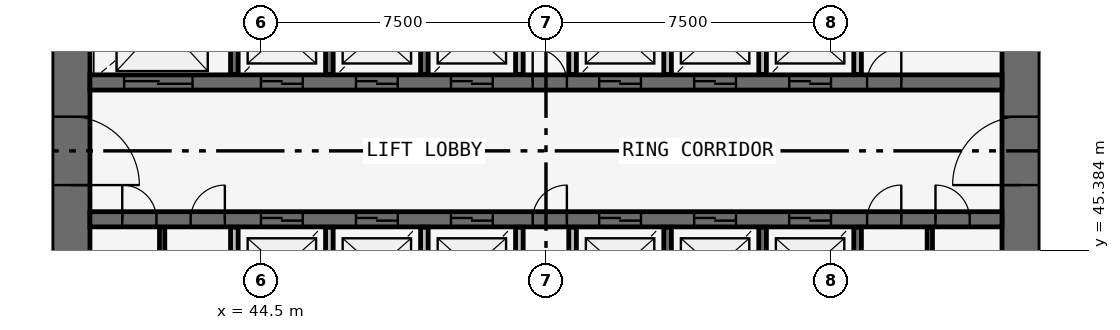
"""IFC4 building model, lengths in metres.
Left out: names, types, materials, properties, quantities, classifications, styles, units other than length and angle.
Written with IfcOpenShell. Run it as: python <this file> out.ifc"""

import sys

from ifc_helpers import new_model, si_unit, direction, frame, frame_2d, origin, place, context, subcontext, project, spatial, rectangle, extrude, source, transform, mapped, element, fill, save


model = new_model("IFC4")
c1 = context("Model", 3, precision=1e-05, world=origin(), true_north=direction((0.0, 1.0)))
c2 = subcontext(c1, "Body", "Model", "MODEL_VIEW")
j1 = project(units=[si_unit("LENGTHUNIT", "METRE"), si_unit("PLANEANGLEUNIT", "RADIAN")], contexts=[c1])
p1 = place(None, origin())
s1 = spatial("IfcSite", under=j1, at=p1, CompositionType="ELEMENT")
p2 = place(p1, origin())
s2 = spatial("IfcBuilding", under=s1, at=p2, CompositionType="ELEMENT")
p3 = place(p2, origin())
s3 = spatial("IfcBuildingStorey", under=s2, at=p3, CompositionType="ELEMENT", Elevation=0.0)
p4 = place(p3, frame((64.5, 38.0, -0.35), z_axis=(0.0, 0.0, 1.0), x_axis=(0.0, 1.0, 0.0)))
e1 = element("IfcWall", 1, at=p4, inside=s3, PredefinedType="SHEAR", context=c2, shape_type="SweptSolid", body=[
    extrude(rectangle(XDim=20.0, YDim=1.0, at=frame_2d((10.0, 0.0))), origin(), (0.0, 0.0, 1.0), 5.35),
])
p5 = place(p4, frame((9.1, 0.0, 0.35)))
e2 = element("IfcOpeningElement", 2, at=p5, cuts=e1, PredefinedType="OPENING", context=c2, shape_type="SweptSolid", body=[
    extrude(rectangle(XDim=1.8, YDim=2.1, at=frame_2d((0.9, 1.05))), frame((0.0, 0.51, 0.0), z_axis=(0.0, -1.0, 0.0), x_axis=(1.0, 0.0, 0.0)), (0.0, 0.0, 1.0), 1.02),
])
p6 = place(p3, frame((39.5, 58.0, -0.35), z_axis=(0.0, 0.0, 1.0), x_axis=(0.0, -1.0, 0.0)))
e3 = element("IfcWall", 3, at=p6, inside=s3, PredefinedType="SHEAR", context=c2, shape_type="SweptSolid", body=[
    extrude(rectangle(XDim=20.0, YDim=1.0, at=frame_2d((10.0, 0.0))), origin(), (0.0, 0.0, 1.0), 5.35),
])
p7 = place(p6, frame((9.1, 0.0, 0.35)))
e4 = element("IfcOpeningElement", 4, at=p7, cuts=e3, PredefinedType="OPENING", context=c2, shape_type="SweptSolid", body=[
    extrude(rectangle(XDim=1.8, YDim=2.1, at=frame_2d((0.9, 1.05))), frame((0.0, 0.51, 0.0), z_axis=(0.0, -1.0, 0.0), x_axis=(1.0, 0.0, 0.0)), (0.0, 0.0, 1.0), 1.02),
])
p8 = place(p3, frame((40.0, 49.8, -0.35), z_axis=(0.0, 0.0, 1.0), x_axis=(1.0, 0.0, 0.0)))
e5 = element("IfcWall", 5, at=p8, inside=s3, PredefinedType="SHEAR", context=c2, shape_type="SweptSolid", body=[
    extrude(rectangle(XDim=24.0, YDim=0.4, at=frame_2d((12.0, 0.0))), origin(), (0.0, 0.0, 1.0), 5.35),
])
p9 = place(p8, frame((13.4, 0.0, 0.35)))
e6 = element("IfcOpeningElement", 6, at=p9, cuts=e5, PredefinedType="OPENING", context=c2, shape_type="SweptSolid", body=[
    extrude(rectangle(XDim=1.1, YDim=2.1, at=frame_2d((0.55, 1.05))), frame((0.0, 0.21, 0.0), z_axis=(0.0, -1.0, 0.0), x_axis=(1.0, 0.0, 0.0)), (0.0, 0.0, 1.0), 0.42),
])
p10 = place(p8, frame((15.9, 0.0, 0.35)))
e7 = element("IfcOpeningElement", 7, at=p10, cuts=e5, PredefinedType="OPENING", context=c2, shape_type="SweptSolid", body=[
    extrude(rectangle(XDim=1.1, YDim=2.1, at=frame_2d((0.55, 1.05))), frame((0.0, 0.21, 0.0), z_axis=(0.0, -1.0, 0.0), x_axis=(1.0, 0.0, 0.0)), (0.0, 0.0, 1.0), 0.42),
])
p11 = place(p8, frame((18.4, 0.0, 0.35)))
e8 = element("IfcOpeningElement", 8, at=p11, cuts=e5, PredefinedType="OPENING", context=c2, shape_type="SweptSolid", body=[
    extrude(rectangle(XDim=1.1, YDim=2.1, at=frame_2d((0.55, 1.05))), frame((0.0, 0.21, 0.0), z_axis=(0.0, -1.0, 0.0), x_axis=(1.0, 0.0, 0.0)), (0.0, 0.0, 1.0), 0.42),
])
p12 = place(p8, frame((4.5, 0.0, 0.35)))
e9 = element("IfcOpeningElement", 9, at=p12, cuts=e5, PredefinedType="OPENING", context=c2, shape_type="SweptSolid", body=[
    extrude(rectangle(XDim=1.1, YDim=2.1, at=frame_2d((0.55, 1.05))), frame((0.0, 0.21, 0.0), z_axis=(0.0, -1.0, 0.0), x_axis=(1.0, 0.0, 0.0)), (0.0, 0.0, 1.0), 0.42),
])
p13 = place(p8, frame((7.0, 0.0, 0.35)))
e10 = element("IfcOpeningElement", 10, at=p13, cuts=e5, PredefinedType="OPENING", context=c2, shape_type="SweptSolid", body=[
    extrude(rectangle(XDim=1.1, YDim=2.1, at=frame_2d((0.55, 1.05))), frame((0.0, 0.21, 0.0), z_axis=(0.0, -1.0, 0.0), x_axis=(1.0, 0.0, 0.0)), (0.0, 0.0, 1.0), 0.42),
])
p14 = place(p8, frame((9.5, 0.0, 0.35)))
e11 = element("IfcOpeningElement", 11, at=p14, cuts=e5, PredefinedType="OPENING", context=c2, shape_type="SweptSolid", body=[
    extrude(rectangle(XDim=1.1, YDim=2.1, at=frame_2d((0.55, 1.05))), frame((0.0, 0.21, 0.0), z_axis=(0.0, -1.0, 0.0), x_axis=(1.0, 0.0, 0.0)), (0.0, 0.0, 1.0), 0.42),
])
p15 = place(p8, frame((0.9, 0.0, 0.35)))
e12 = element("IfcOpeningElement", 12, at=p15, cuts=e5, PredefinedType="OPENING", context=c2, shape_type="SweptSolid", body=[
    extrude(rectangle(XDim=1.8, YDim=2.4, at=frame_2d((0.9, 1.2))), frame((0.0, 0.21, 0.0), z_axis=(0.0, -1.0, 0.0), x_axis=(1.0, 0.0, 0.0)), (0.0, 0.0, 1.0), 0.42),
])
p16 = place(p8, frame((20.45, 0.0, 0.35)))
e13 = element("IfcOpeningElement", 13, at=p16, cuts=e5, PredefinedType="OPENING", context=c2, shape_type="SweptSolid", body=[
    extrude(rectangle(XDim=0.9, YDim=2.1, at=frame_2d((0.45, 1.05))), frame((0.0, 0.21, 0.0), z_axis=(0.0, -1.0, 0.0), x_axis=(1.0, 0.0, 0.0)), (0.0, 0.0, 1.0), 0.42),
])
p17 = place(p8, frame((11.65, 0.0, 0.35)))
e14 = element("IfcOpeningElement", 14, at=p17, cuts=e5, PredefinedType="OPENING", context=c2, shape_type="SweptSolid", body=[
    extrude(rectangle(XDim=0.9, YDim=2.1, at=frame_2d((0.45, 1.05))), frame((0.0, 0.21, 0.0), z_axis=(0.0, -1.0, 0.0), x_axis=(1.0, 0.0, 0.0)), (0.0, 0.0, 1.0), 0.42),
])
p18 = place(p3, frame((40.0, 46.2, -0.35), z_axis=(0.0, 0.0, 1.0), x_axis=(1.0, 0.0, 0.0)))
e15 = element("IfcWall", 15, at=p18, inside=s3, PredefinedType="SHEAR", context=c2, shape_type="SweptSolid", body=[
    extrude(rectangle(XDim=24.0, YDim=0.4, at=frame_2d((12.0, 0.0))), origin(), (0.0, 0.0, 1.0), 5.35),
])
p19 = place(p18, frame((13.4, 0.0, 0.35)))
e16 = element("IfcOpeningElement", 16, at=p19, cuts=e15, PredefinedType="OPENING", context=c2, shape_type="SweptSolid", body=[
    extrude(rectangle(XDim=1.1, YDim=2.1, at=frame_2d((0.55, 1.05))), frame((0.0, 0.21, 0.0), z_axis=(0.0, -1.0, 0.0), x_axis=(1.0, 0.0, 0.0)), (0.0, 0.0, 1.0), 0.42),
])
p20 = place(p18, frame((15.9, 0.0, 0.35)))
e17 = element("IfcOpeningElement", 17, at=p20, cuts=e15, PredefinedType="OPENING", context=c2, shape_type="SweptSolid", body=[
    extrude(rectangle(XDim=1.1, YDim=2.1, at=frame_2d((0.55, 1.05))), frame((0.0, 0.21, 0.0), z_axis=(0.0, -1.0, 0.0), x_axis=(1.0, 0.0, 0.0)), (0.0, 0.0, 1.0), 0.42),
])
p21 = place(p18, frame((18.4, 0.0, 0.35)))
e18 = element("IfcOpeningElement", 18, at=p21, cuts=e15, PredefinedType="OPENING", context=c2, shape_type="SweptSolid", body=[
    extrude(rectangle(XDim=1.1, YDim=2.1, at=frame_2d((0.55, 1.05))), frame((0.0, 0.21, 0.0), z_axis=(0.0, -1.0, 0.0), x_axis=(1.0, 0.0, 0.0)), (0.0, 0.0, 1.0), 0.42),
])
p22 = place(p18, frame((4.5, 0.0, 0.35)))
e19 = element("IfcOpeningElement", 19, at=p22, cuts=e15, PredefinedType="OPENING", context=c2, shape_type="SweptSolid", body=[
    extrude(rectangle(XDim=1.1, YDim=2.1, at=frame_2d((0.55, 1.05))), frame((0.0, 0.21, 0.0), z_axis=(0.0, -1.0, 0.0), x_axis=(1.0, 0.0, 0.0)), (0.0, 0.0, 1.0), 0.42),
])
p23 = place(p18, frame((7.0, 0.0, 0.35)))
e20 = element("IfcOpeningElement", 20, at=p23, cuts=e15, PredefinedType="OPENING", context=c2, shape_type="SweptSolid", body=[
    extrude(rectangle(XDim=1.1, YDim=2.1, at=frame_2d((0.55, 1.05))), frame((0.0, 0.21, 0.0), z_axis=(0.0, -1.0, 0.0), x_axis=(1.0, 0.0, 0.0)), (0.0, 0.0, 1.0), 0.42),
])
p24 = place(p18, frame((9.5, 0.0, 0.35)))
e21 = element("IfcOpeningElement", 21, at=p24, cuts=e15, PredefinedType="OPENING", context=c2, shape_type="SweptSolid", body=[
    extrude(rectangle(XDim=1.1, YDim=2.1, at=frame_2d((0.55, 1.05))), frame((0.0, 0.21, 0.0), z_axis=(0.0, -1.0, 0.0), x_axis=(1.0, 0.0, 0.0)), (0.0, 0.0, 1.0), 0.42),
])
p25 = place(p18, frame((20.45, 0.0, 0.35)))
e22 = element("IfcOpeningElement", 22, at=p25, cuts=e15, PredefinedType="OPENING", context=c2, shape_type="SweptSolid", body=[
    extrude(rectangle(XDim=0.9, YDim=2.1, at=frame_2d((0.45, 1.05))), frame((0.0, 0.21, 0.0), z_axis=(0.0, -1.0, 0.0), x_axis=(1.0, 0.0, 0.0)), (0.0, 0.0, 1.0), 0.42),
])
p26 = place(p18, frame((22.25, 0.0, 0.35)))
e23 = element("IfcOpeningElement", 23, at=p26, cuts=e15, PredefinedType="OPENING", context=c2, shape_type="SweptSolid", body=[
    extrude(rectangle(XDim=0.9, YDim=2.1, at=frame_2d((0.45, 1.05))), frame((0.0, 0.21, 0.0), z_axis=(0.0, -1.0, 0.0), x_axis=(1.0, 0.0, 0.0)), (0.0, 0.0, 1.0), 0.42),
])
p27 = place(p18, frame((0.85, 0.0, 0.35)))
e24 = element("IfcOpeningElement", 24, at=p27, cuts=e15, PredefinedType="OPENING", context=c2, shape_type="SweptSolid", body=[
    extrude(rectangle(XDim=0.9, YDim=2.1, at=frame_2d((0.45, 1.05))), frame((0.0, 0.21, 0.0), z_axis=(0.0, -1.0, 0.0), x_axis=(1.0, 0.0, 0.0)), (0.0, 0.0, 1.0), 0.42),
])
p28 = place(p18, frame((2.65, 0.0, 0.35)))
e25 = element("IfcOpeningElement", 25, at=p28, cuts=e15, PredefinedType="OPENING", context=c2, shape_type="SweptSolid", body=[
    extrude(rectangle(XDim=0.9, YDim=2.1, at=frame_2d((0.45, 1.05))), frame((0.0, 0.21, 0.0), z_axis=(0.0, -1.0, 0.0), x_axis=(1.0, 0.0, 0.0)), (0.0, 0.0, 1.0), 0.42),
])
p29 = place(p18, frame((11.65, 0.0, 0.35)))
e26 = element("IfcOpeningElement", 26, at=p29, cuts=e15, PredefinedType="OPENING", context=c2, shape_type="SweptSolid", body=[
    extrude(rectangle(XDim=0.9, YDim=2.1, at=frame_2d((0.45, 1.05))), frame((0.0, 0.21, 0.0), z_axis=(0.0, -1.0, 0.0), x_axis=(1.0, 0.0, 0.0)), (0.0, 0.0, 1.0), 0.42),
])
for number, where, z_axis, x_axis in (
    (27, (43.8, 45.99, 0.0), (0.0, 0.0, 1.0), (0.0, -1.0, 0.0)),
    (28, (43.8, 52.37, 0.0), (0.0, 0.0, 1.0), (0.0, -1.0, 0.0)),
):
    element("IfcWall", number, at=place(p3, frame(where, z_axis=z_axis, x_axis=x_axis)), inside=s3, PredefinedType="SOLIDWALL", context=c2, shape_type="SweptSolid", body=[
        extrude(rectangle(XDim=2.36, YDim=0.2, at=frame_2d((1.18, 0.0))), origin(), (0.0, 0.0, 1.0), 4.65),
    ])
p30 = place(p3, frame((46.3, 43.6, 0.0), z_axis=(0.0, 0.0, 1.0), x_axis=(0.0, 1.0, 0.0)))
e29 = element("IfcWall", 29, at=p30, inside=s3, PredefinedType="SOLIDWALL", context=c2, shape_type="SweptSolid", body=[
    extrude(rectangle(XDim=2.39, YDim=0.2, at=frame_2d((1.195, 0.0))), origin(), (0.0, 0.0, 1.0), 4.65),
])
for number, where, z_axis, x_axis in (
    (30, (46.3, 50.01, 0.0), (0.0, 0.0, 1.0), (0.0, 1.0, 0.0)),
    (31, (48.8, 43.63, 0.0), (0.0, 0.0, 1.0), (0.0, 1.0, 0.0)),
    (32, (48.8, 50.01, 0.0), (0.0, 0.0, 1.0), (0.0, 1.0, 0.0)),
    (33, (51.3, 43.63, 0.0), (0.0, 0.0, 1.0), (0.0, 1.0, 0.0)),
):
    element("IfcWall", number, at=place(p3, frame(where, z_axis=z_axis, x_axis=x_axis)), inside=s3, PredefinedType="SOLIDWALL", context=c2, shape_type="SweptSolid", body=[
        extrude(rectangle(XDim=2.36, YDim=0.2, at=frame_2d((1.18, 0.0))), origin(), (0.0, 0.0, 1.0), 4.65),
    ])
for number, where, z_axis, x_axis in (
    (34, (51.3, 50.01, 0.0), (0.0, 0.0, 1.0), (0.0, 1.0, 0.0)),
    (35, (52.7, 45.99, 0.0), (0.0, 0.0, 1.0), (0.0, -1.0, 0.0)),
):
    element("IfcWall", number, at=place(p3, frame(where, z_axis=z_axis, x_axis=x_axis)), inside=s3, PredefinedType="SOLIDWALL", context=c2, shape_type="SweptSolid", body=[
        extrude(rectangle(XDim=2.39, YDim=0.2, at=frame_2d((1.195, 0.0))), origin(), (0.0, 0.0, 1.0), 4.65),
    ])
for number, where, z_axis, x_axis in (
    (36, (52.7, 52.37, 0.0), (0.0, 0.0, 1.0), (0.0, -1.0, 0.0)),
    (37, (55.2, 43.63, 0.0), (0.0, 0.0, 1.0), (0.0, 1.0, 0.0)),
    (38, (55.2, 50.01, 0.0), (0.0, 0.0, 1.0), (0.0, 1.0, 0.0)),
    (39, (57.7, 43.63, 0.0), (0.0, 0.0, 1.0), (0.0, 1.0, 0.0)),
):
    element("IfcWall", number, at=place(p3, frame(where, z_axis=z_axis, x_axis=x_axis)), inside=s3, PredefinedType="SOLIDWALL", context=c2, shape_type="SweptSolid", body=[
        extrude(rectangle(XDim=2.36, YDim=0.2, at=frame_2d((1.18, 0.0))), origin(), (0.0, 0.0, 1.0), 4.65),
    ])
p31 = place(p3, frame((57.7, 50.01, 0.0), z_axis=(0.0, 0.0, 1.0), x_axis=(0.0, 1.0, 0.0)))
e40 = element("IfcWall", 40, at=p31, inside=s3, PredefinedType="SOLIDWALL", context=c2, shape_type="SweptSolid", body=[
    extrude(rectangle(XDim=2.39, YDim=0.2, at=frame_2d((1.195, 0.0))), origin(), (0.0, 0.0, 1.0), 4.65),
])
for number, where, z_axis, x_axis in (
    (41, (60.2, 43.63, 0.0), (0.0, 0.0, 1.0), (0.0, 1.0, 0.0)),
    (42, (60.2, 50.01, 0.0), (0.0, 0.0, 1.0), (0.0, 1.0, 0.0)),
):
    element("IfcWall", number, at=place(p3, frame(where, z_axis=z_axis, x_axis=x_axis)), inside=s3, PredefinedType="SOLIDWALL", context=c2, shape_type="SweptSolid", body=[
        extrude(rectangle(XDim=2.36, YDim=0.2, at=frame_2d((1.18, 0.0))), origin(), (0.0, 0.0, 1.0), 4.65),
    ])
for number, where, z_axis, x_axis in (
    (43, (41.9, 43.6, 0.0), (0.0, 0.0, 1.0), (0.0, 1.0, 0.0)),
    (44, (62.1, 43.6, 0.0), (0.0, 0.0, 1.0), (0.0, 1.0, 0.0)),
):
    element("IfcWall", number, at=place(p3, frame(where, z_axis=z_axis, x_axis=x_axis)), inside=s3, PredefinedType="PARTITIONING", context=c2, shape_type="SweptSolid", body=[
        extrude(rectangle(XDim=2.39, YDim=0.14, at=frame_2d((1.195, 0.0))), origin(), (0.0, 0.0, 1.0), 3.85),
    ])
m1 = source(origin(), c2, "Body", "SweptSolid", [
    extrude(rectangle(XDim=1.8, YDim=2.1, at=frame_2d((0.9, 1.05))), frame((0.0, 0.025, 0.0), z_axis=(0.0, -1.0, 0.0), x_axis=(1.0, 0.0, 0.0)), (0.0, 0.0, 1.0), 0.05),
])
p32 = place(p7, origin())
e45 = element("IfcDoor", 45, at=p32, inside=s3, OperationType="SINGLE_SWING_RIGHT", PredefinedType="DOOR", context=c2, shape_type="MappedRepresentation", body=[
    mapped(m1, transform((0.0, 0.0, 0.0), scale=1.0)),
])
fill(e4, e45)
p33 = place(p5, origin())
e46 = element("IfcDoor", 46, at=p33, inside=s3, OperationType="SINGLE_SWING_LEFT", PredefinedType="DOOR", context=c2, shape_type="MappedRepresentation", body=[
    mapped(m1, transform((0.0, 0.0, 0.0), scale=1.0)),
])
fill(e2, e46)
m2 = source(origin(), c2, "Body", "SweptSolid", [
    extrude(rectangle(XDim=1.1, YDim=2.1, at=frame_2d((0.55, 1.05))), frame((0.0, 0.025, 0.0), z_axis=(0.0, -1.0, 0.0), x_axis=(1.0, 0.0, 0.0)), (0.0, 0.0, 1.0), 0.05),
])
p34 = place(p9, origin())
e47 = element("IfcDoor", 47, at=p34, inside=s3, OperationType="DOUBLE_DOOR_SLIDING", PredefinedType="USERDEFINED", context=c2, shape_type="MappedRepresentation", body=[
    mapped(m2, transform((0.0, 0.0, 0.0), scale=1.0)),
])
fill(e6, e47)
p35 = place(p10, origin())
e48 = element("IfcDoor", 48, at=p35, inside=s3, OperationType="DOUBLE_DOOR_SLIDING", PredefinedType="USERDEFINED", context=c2, shape_type="MappedRepresentation", body=[
    mapped(m2, transform((0.0, 0.0, 0.0), scale=1.0)),
])
fill(e7, e48)
p36 = place(p11, origin())
e49 = element("IfcDoor", 49, at=p36, inside=s3, OperationType="DOUBLE_DOOR_SLIDING", PredefinedType="USERDEFINED", context=c2, shape_type="MappedRepresentation", body=[
    mapped(m2, transform((0.0, 0.0, 0.0), scale=1.0)),
])
fill(e8, e49)
p37 = place(p19, origin())
e50 = element("IfcDoor", 50, at=p37, inside=s3, OperationType="DOUBLE_DOOR_SLIDING", PredefinedType="USERDEFINED", context=c2, shape_type="MappedRepresentation", body=[
    mapped(m2, transform((0.0, 0.0, 0.0), scale=1.0)),
])
fill(e16, e50)
p38 = place(p20, origin())
e51 = element("IfcDoor", 51, at=p38, inside=s3, OperationType="DOUBLE_DOOR_SLIDING", PredefinedType="USERDEFINED", context=c2, shape_type="MappedRepresentation", body=[
    mapped(m2, transform((0.0, 0.0, 0.0), scale=1.0)),
])
fill(e17, e51)
p39 = place(p21, origin())
e52 = element("IfcDoor", 52, at=p39, inside=s3, OperationType="DOUBLE_DOOR_SLIDING", PredefinedType="USERDEFINED", context=c2, shape_type="MappedRepresentation", body=[
    mapped(m2, transform((0.0, 0.0, 0.0), scale=1.0)),
])
fill(e18, e52)
p40 = place(p12, origin())
e53 = element("IfcDoor", 53, at=p40, inside=s3, OperationType="DOUBLE_DOOR_SLIDING", PredefinedType="USERDEFINED", context=c2, shape_type="MappedRepresentation", body=[
    mapped(m2, transform((0.0, 0.0, 0.0), scale=1.0)),
])
fill(e9, e53)
p41 = place(p13, origin())
e54 = element("IfcDoor", 54, at=p41, inside=s3, OperationType="DOUBLE_DOOR_SLIDING", PredefinedType="USERDEFINED", context=c2, shape_type="MappedRepresentation", body=[
    mapped(m2, transform((0.0, 0.0, 0.0), scale=1.0)),
])
fill(e10, e54)
p42 = place(p14, origin())
e55 = element("IfcDoor", 55, at=p42, inside=s3, OperationType="DOUBLE_DOOR_SLIDING", PredefinedType="USERDEFINED", context=c2, shape_type="MappedRepresentation", body=[
    mapped(m2, transform((0.0, 0.0, 0.0), scale=1.0)),
])
fill(e11, e55)
p43 = place(p22, origin())
e56 = element("IfcDoor", 56, at=p43, inside=s3, OperationType="DOUBLE_DOOR_SLIDING", PredefinedType="USERDEFINED", context=c2, shape_type="MappedRepresentation", body=[
    mapped(m2, transform((0.0, 0.0, 0.0), scale=1.0)),
])
fill(e19, e56)
p44 = place(p23, origin())
e57 = element("IfcDoor", 57, at=p44, inside=s3, OperationType="DOUBLE_DOOR_SLIDING", PredefinedType="USERDEFINED", context=c2, shape_type="MappedRepresentation", body=[
    mapped(m2, transform((0.0, 0.0, 0.0), scale=1.0)),
])
fill(e20, e57)
p45 = place(p24, origin())
e58 = element("IfcDoor", 58, at=p45, inside=s3, OperationType="DOUBLE_DOOR_SLIDING", PredefinedType="USERDEFINED", context=c2, shape_type="MappedRepresentation", body=[
    mapped(m2, transform((0.0, 0.0, 0.0), scale=1.0)),
])
fill(e21, e58)
m3 = source(origin(), c2, "Body", "SweptSolid", [
    extrude(rectangle(XDim=1.8, YDim=2.4, at=frame_2d((0.9, 1.2))), frame((0.0, 0.025, 0.0), z_axis=(0.0, -1.0, 0.0), x_axis=(1.0, 0.0, 0.0)), (0.0, 0.0, 1.0), 0.05),
])
p46 = place(p15, origin())
e59 = element("IfcDoor", 59, at=p46, inside=s3, OperationType="DOUBLE_DOOR_SLIDING", PredefinedType="USERDEFINED", context=c2, shape_type="MappedRepresentation", body=[
    mapped(m3, transform((0.0, 0.0, 0.0), scale=1.0)),
])
fill(e12, e59)
m4 = source(origin(), c2, "Body", "SweptSolid", [
    extrude(rectangle(XDim=0.9, YDim=2.1, at=frame_2d((0.45, 1.05))), frame((0.0, 0.025, 0.0), z_axis=(0.0, -1.0, 0.0), x_axis=(1.0, 0.0, 0.0)), (0.0, 0.0, 1.0), 0.05),
])
p47 = place(p25, origin())
e60 = element("IfcDoor", 60, at=p47, inside=s3, OperationType="SINGLE_SWING_RIGHT", PredefinedType="DOOR", context=c2, shape_type="MappedRepresentation", body=[
    mapped(m4, transform((0.0, 0.0, 0.0), scale=1.0)),
])
fill(e22, e60)
p48 = place(p26, origin())
e61 = element("IfcDoor", 61, at=p48, inside=s3, OperationType="SINGLE_SWING_LEFT", PredefinedType="DOOR", context=c2, shape_type="MappedRepresentation", body=[
    mapped(m4, transform((0.0, 0.0, 0.0), scale=1.0)),
])
fill(e23, e61)
p49 = place(p16, origin())
e62 = element("IfcDoor", 62, at=p49, inside=s3, OperationType="SINGLE_SWING_RIGHT", PredefinedType="DOOR", context=c2, shape_type="MappedRepresentation", body=[
    mapped(m4, transform((0.0, 0.0, 0.0), scale=1.0)),
])
fill(e13, e62)
p50 = place(p27, origin())
e63 = element("IfcDoor", 63, at=p50, inside=s3, OperationType="SINGLE_SWING_LEFT", PredefinedType="DOOR", context=c2, shape_type="MappedRepresentation", body=[
    mapped(m4, transform((0.0, 0.0, 0.0), scale=1.0)),
])
fill(e24, e63)
p51 = place(p28, origin())
e64 = element("IfcDoor", 64, at=p51, inside=s3, OperationType="SINGLE_SWING_RIGHT", PredefinedType="DOOR", context=c2, shape_type="MappedRepresentation", body=[
    mapped(m4, transform((0.0, 0.0, 0.0), scale=1.0)),
])
fill(e25, e64)
p52 = place(p17, origin())
e65 = element("IfcDoor", 65, at=p52, inside=s3, OperationType="SINGLE_SWING_LEFT", PredefinedType="DOOR", context=c2, shape_type="MappedRepresentation", body=[
    mapped(m4, transform((0.0, 0.0, 0.0), scale=1.0)),
])
fill(e14, e65)
p53 = place(p29, origin())
e66 = element("IfcDoor", 66, at=p53, inside=s3, OperationType="SINGLE_SWING_RIGHT", PredefinedType="DOOR", context=c2, shape_type="MappedRepresentation", body=[
    mapped(m4, transform((0.0, 0.0, 0.0), scale=1.0)),
])
fill(e26, e66)
save(model, sys.argv[1])
